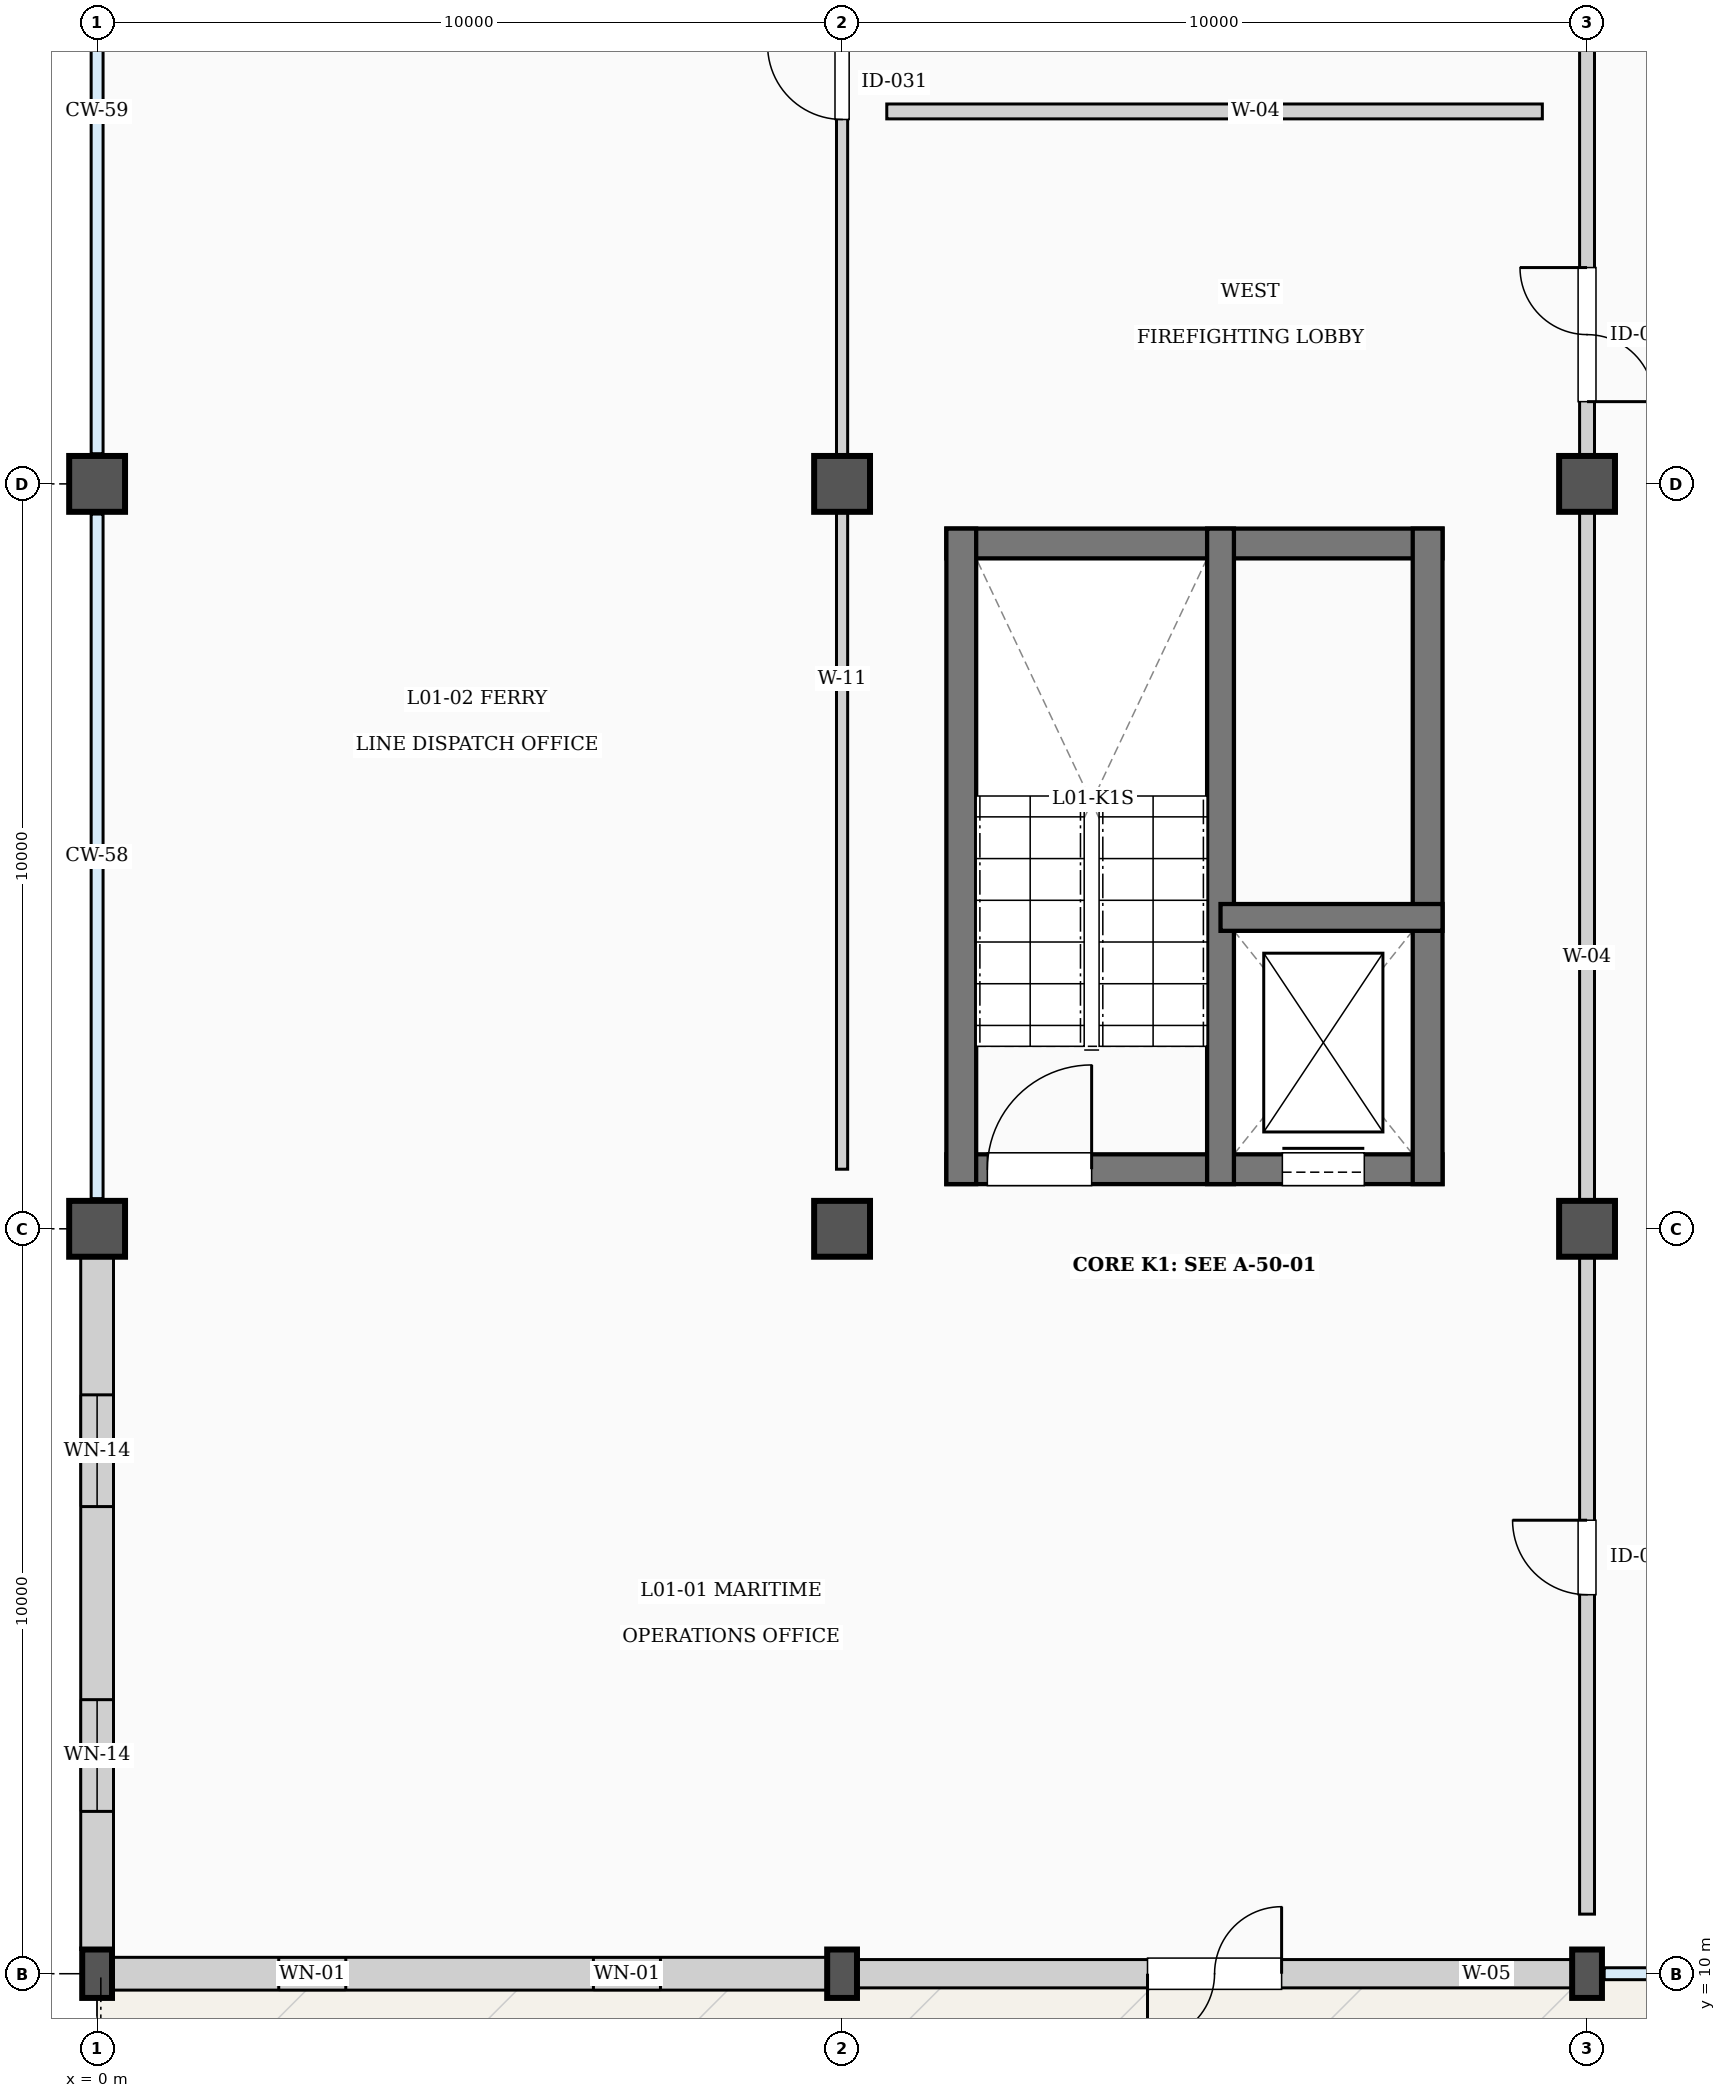
"""IFC4 building model, lengths in metres.
Left out: names, types, materials, properties, quantities, classifications, styles, units other than length and angle.
Written with IfcOpenShell. Run it as: python <this file> out.ifc"""

import sys

from ifc_helpers import new_model, si_unit, direction, frame, frame_2d, origin, origin_2d, place, context, subcontext, project, spatial, rectangle, extrude, element, fill, save


model = new_model("IFC4")
c1 = context("Model", 3, precision=1e-05, world=origin(), true_north=direction((0.0, 1.0)))
c2 = subcontext(c1, "Body", "Model", "MODEL_VIEW")
j1 = project(units=[si_unit("LENGTHUNIT", "METRE"), si_unit("PLANEANGLEUNIT", "RADIAN")], contexts=[c1])
p1 = place(None, origin())
s1 = spatial("IfcSite", under=j1, at=p1, CompositionType="ELEMENT")
p2 = place(p1, origin())
s2 = spatial("IfcBuilding", under=s1, at=p2, CompositionType="ELEMENT")
p3 = place(p2, frame((0.0, 0.0, 5.4)))
s3 = spatial("IfcBuildingStorey", under=s2, at=p3, CompositionType="ELEMENT", Elevation=5.4)
p4 = place(p3, frame((0.0, 10.0, 0.0), z_axis=(0.0, 0.0, 1.0), x_axis=(1.0, 0.0, 0.0)))
e1 = element("IfcColumn", 1, at=p4, inside=s3, PredefinedType="COLUMN", context=c2, shape_type="SweptSolid", body=[
    extrude(rectangle(XDim=0.4, YDim=0.65, at=origin_2d()), origin(), (0.0, 0.0, 1.0), 4.8),
])
for number, where, z_axis, x_axis in (
    (2, (0.0, 20.0, 0.0), (0.0, 0.0, 1.0), (1.0, 0.0, 0.0)),
    (3, (0.0, 30.0, 0.0), (0.0, 0.0, 1.0), (1.0, 0.0, 0.0)),
):
    element("IfcColumn", number, at=place(p3, frame(where, z_axis=z_axis, x_axis=x_axis)), inside=s3, PredefinedType="COLUMN", context=c2, shape_type="SweptSolid", body=[
        extrude(rectangle(XDim=0.75, YDim=0.75, at=origin_2d()), origin(), (0.0, 0.0, 1.0), 4.8),
    ])
p5 = place(p3, frame((10.0, 10.0, 0.0), z_axis=(0.0, 0.0, 1.0), x_axis=(1.0, 0.0, 0.0)))
e4 = element("IfcColumn", 4, at=p5, inside=s3, PredefinedType="COLUMN", context=c2, shape_type="SweptSolid", body=[
    extrude(rectangle(XDim=0.4, YDim=0.65, at=origin_2d()), origin(), (0.0, 0.0, 1.0), 4.8),
])
for number, where, z_axis, x_axis in (
    (5, (10.0, 20.0, 0.0), (0.0, 0.0, 1.0), (1.0, 0.0, 0.0)),
    (6, (10.0, 30.0, 0.0), (0.0, 0.0, 1.0), (1.0, 0.0, 0.0)),
):
    element("IfcColumn", number, at=place(p3, frame(where, z_axis=z_axis, x_axis=x_axis)), inside=s3, PredefinedType="COLUMN", context=c2, shape_type="SweptSolid", body=[
        extrude(rectangle(XDim=0.75, YDim=0.75, at=origin_2d()), origin(), (0.0, 0.0, 1.0), 4.8),
    ])
p6 = place(p3, frame((20.0, 10.0, 0.0), z_axis=(0.0, 0.0, 1.0), x_axis=(1.0, 0.0, 0.0)))
e7 = element("IfcColumn", 7, at=p6, inside=s3, PredefinedType="COLUMN", context=c2, shape_type="SweptSolid", body=[
    extrude(rectangle(XDim=0.4, YDim=0.65, at=origin_2d()), origin(), (0.0, 0.0, 1.0), 4.8),
])
for number, where, z_axis, x_axis in (
    (8, (20.0, 20.0, 0.0), (0.0, 0.0, 1.0), (1.0, 0.0, 0.0)),
    (9, (20.0, 30.0, 0.0), (0.0, 0.0, 1.0), (1.0, 0.0, 0.0)),
):
    element("IfcColumn", number, at=place(p3, frame(where, z_axis=z_axis, x_axis=x_axis)), inside=s3, PredefinedType="COLUMN", context=c2, shape_type="SweptSolid", body=[
        extrude(rectangle(XDim=0.75, YDim=0.75, at=origin_2d()), origin(), (0.0, 0.0, 1.0), 4.8),
    ])
p7 = place(p3, frame((0.2, 10.0, 0.0), z_axis=(0.0, 0.0, 1.0), x_axis=(1.0, 0.0, 0.0)))
e10 = element("IfcWall", 10, at=p7, inside=s3, PredefinedType="SOLIDWALL", context=c2, shape_type="SweptSolid", body=[
    extrude(rectangle(XDim=9.6, YDim=0.44, at=frame_2d((4.8, 0.0))), origin(), (0.0, 0.0, 1.0), 4.05),
])
p8 = place(p7, frame((2.238, 0.0, 0.9)))
e11 = element("IfcOpeningElement", 11, at=p8, cuts=e10, PredefinedType="OPENING", context=c2, shape_type="SweptSolid", body=[
    extrude(rectangle(XDim=0.9, YDim=1.5, at=frame_2d((0.45, 0.75))), frame((0.0, 0.23, 0.0), z_axis=(0.0, -1.0, 0.0), x_axis=(1.0, 0.0, 0.0)), (0.0, 0.0, 1.0), 0.46),
])
p9 = place(p7, frame((6.462, 0.0, 0.9)))
e12 = element("IfcOpeningElement", 12, at=p9, cuts=e10, PredefinedType="OPENING", context=c2, shape_type="SweptSolid", body=[
    extrude(rectangle(XDim=0.9, YDim=1.5, at=frame_2d((0.45, 0.75))), frame((0.0, 0.23, 0.0), z_axis=(0.0, -1.0, 0.0), x_axis=(1.0, 0.0, 0.0)), (0.0, 0.0, 1.0), 0.46),
])
p10 = place(p3, frame((10.2, 10.0, 0.0), z_axis=(0.0, 0.0, 1.0), x_axis=(1.0, 0.0, 0.0)))
e13 = element("IfcWall", 13, at=p10, inside=s3, PredefinedType="SOLIDWALL", context=c2, shape_type="SweptSolid", body=[
    extrude(rectangle(XDim=9.6, YDim=0.38, at=frame_2d((4.8, 0.0))), origin(), (0.0, 0.0, 1.0), 4.05),
])
p11 = place(p10, frame((3.9, 0.0, 0.0)))
e14 = element("IfcOpeningElement", 14, at=p11, cuts=e13, PredefinedType="OPENING", context=c2, shape_type="SweptSolid", body=[
    extrude(rectangle(XDim=1.8, YDim=2.35, at=frame_2d((0.9, 1.175))), frame((0.0, 0.2, 0.0), z_axis=(0.0, -1.0, 0.0), x_axis=(1.0, 0.0, 0.0)), (0.0, 0.0, 1.0), 0.4),
])
p12 = place(p3, frame((0.0, 10.325, 0.0), z_axis=(0.0, 0.0, 1.0), x_axis=(0.0, 1.0, 0.0)))
e15 = element("IfcWall", 15, at=p12, inside=s3, PredefinedType="SOLIDWALL", context=c2, shape_type="SweptSolid", body=[
    extrude(rectangle(XDim=9.3, YDim=0.44, at=frame_2d((4.65, 0.0))), origin(), (0.0, 0.0, 1.0), 4.3),
])
p13 = place(p12, frame((1.854, 0.0, 0.9)))
e16 = element("IfcOpeningElement", 16, at=p13, cuts=e15, PredefinedType="OPENING", context=c2, shape_type="SweptSolid", body=[
    extrude(rectangle(XDim=1.5, YDim=2.4, at=frame_2d((0.75, 1.2))), frame((0.0, 0.23, 0.0), z_axis=(0.0, -1.0, 0.0), x_axis=(1.0, 0.0, 0.0)), (0.0, 0.0, 1.0), 0.46),
])
p14 = place(p12, frame((5.946, 0.0, 0.9)))
e17 = element("IfcOpeningElement", 17, at=p14, cuts=e15, PredefinedType="OPENING", context=c2, shape_type="SweptSolid", body=[
    extrude(rectangle(XDim=1.5, YDim=2.4, at=frame_2d((0.75, 1.2))), frame((0.0, 0.23, 0.0), z_axis=(0.0, -1.0, 0.0), x_axis=(1.0, 0.0, 0.0)), (0.0, 0.0, 1.0), 0.46),
])
p15 = place(p3, frame((11.4, 20.8, 0.0), z_axis=(0.0, 0.0, 1.0), x_axis=(1.0, 0.0, 0.0)))
e18 = element("IfcWall", 18, at=p15, inside=s3, PredefinedType="SHEAR", context=c2, shape_type="SweptSolid", body=[
    extrude(rectangle(XDim=6.66, YDim=0.4, at=frame_2d((3.33, 0.0))), origin(), (0.0, 0.0, 1.0), 4.8),
])
p16 = place(p15, frame((0.55, 0.0, 0.0)))
e19 = element("IfcOpeningElement", 19, at=p16, cuts=e18, PredefinedType="OPENING", context=c2, shape_type="SweptSolid", body=[
    extrude(rectangle(XDim=1.4, YDim=2.35, at=frame_2d((0.7, 1.175))), frame((0.0, 0.21, 0.0), z_axis=(0.0, -1.0, 0.0), x_axis=(1.0, 0.0, 0.0)), (0.0, 0.0, 1.0), 0.42),
])
p17 = place(p15, frame((4.51, 0.0, 0.0)))
e20 = element("IfcOpeningElement", 20, at=p17, cuts=e18, PredefinedType="OPENING", context=c2, shape_type="SweptSolid", body=[
    extrude(rectangle(XDim=1.1, YDim=2.3, at=frame_2d((0.55, 1.15))), frame((0.0, 0.21, 0.0), z_axis=(0.0, -1.0, 0.0), x_axis=(1.0, 0.0, 0.0)), (0.0, 0.0, 1.0), 0.42),
])
p18 = place(p3, frame((11.4, 29.2, 0.0), z_axis=(0.0, 0.0, 1.0), x_axis=(1.0, 0.0, 0.0)))
e21 = element("IfcWall", 21, at=p18, inside=s3, PredefinedType="SHEAR", context=c2, shape_type="SweptSolid", body=[
    extrude(rectangle(XDim=6.66, YDim=0.4, at=frame_2d((3.33, 0.0))), origin(), (0.0, 0.0, 1.0), 4.8),
])
for number, where, z_axis, x_axis in (
    (22, (11.6, 20.6, 0.0), (0.0, 0.0, 1.0), (0.0, 1.0, 0.0)),
    (23, (17.86, 20.6, 0.0), (0.0, 0.0, 1.0), (0.0, 1.0, 0.0)),
):
    element("IfcWall", number, at=place(p3, frame(where, z_axis=z_axis, x_axis=x_axis)), inside=s3, PredefinedType="SHEAR", context=c2, shape_type="SweptSolid", body=[
        extrude(rectangle(XDim=8.8, YDim=0.4, at=frame_2d((4.4, 0.0))), origin(), (0.0, 0.0, 1.0), 4.8),
    ])
p19 = place(p3, frame((15.08, 20.6, 0.0), z_axis=(0.0, 0.0, 1.0), x_axis=(0.0, 1.0, 0.0)))
e24 = element("IfcWall", 24, at=p19, inside=s3, PredefinedType="SHEAR", context=c2, shape_type="SweptSolid", body=[
    extrude(rectangle(XDim=8.8, YDim=0.36, at=frame_2d((4.4, 0.0))), origin(), (0.0, 0.0, 1.0), 4.8),
])
p20 = place(p3, frame((15.08, 24.18, 0.0), z_axis=(0.0, 0.0, 1.0), x_axis=(1.0, 0.0, 0.0)))
e25 = element("IfcWall", 25, at=p20, inside=s3, PredefinedType="SHEAR", context=c2, shape_type="SweptSolid", body=[
    extrude(rectangle(XDim=2.98, YDim=0.36, at=frame_2d((1.49, 0.0))), origin(), (0.0, 0.0, 1.0), 4.8),
])
p21 = place(p3, frame((20.0, 10.8, 0.0), z_axis=(0.0, 0.0, 1.0), x_axis=(0.0, 1.0, 0.0)))
e26 = element("IfcWall", 26, at=p21, inside=s3, PredefinedType="PARTITIONING", context=c2, shape_type="SweptSolid", body=[
    extrude(rectangle(XDim=68.4, YDim=0.2, at=frame_2d((34.2, 0.0))), origin(), (0.0, 0.0, 1.0), 4.23),
])
p22 = place(p21, frame((4.288, 0.0, 0.0)))
e27 = element("IfcOpeningElement", 27, at=p22, cuts=e26, PredefinedType="OPENING", context=c2, shape_type="SweptSolid", body=[
    extrude(rectangle(XDim=1.0, YDim=2.3, at=frame_2d((0.5, 1.15))), frame((0.0, 0.11, 0.0), z_axis=(0.0, -1.0, 0.0), x_axis=(1.0, 0.0, 0.0)), (0.0, 0.0, 1.0), 0.22),
])
p23 = place(p21, frame((20.304, 0.0, 0.0)))
e28 = element("IfcOpeningElement", 28, at=p23, cuts=e26, PredefinedType="OPENING", context=c2, shape_type="SweptSolid", body=[
    extrude(rectangle(XDim=1.8, YDim=2.45, at=frame_2d((0.9, 1.225))), frame((0.0, 0.11, 0.0), z_axis=(0.0, -1.0, 0.0), x_axis=(1.0, 0.0, 0.0)), (0.0, 0.0, 1.0), 0.22),
])
p24 = place(p21, frame((30.464, 0.0, 0.0)))
e29 = element("IfcOpeningElement", 29, at=p24, cuts=e26, PredefinedType="OPENING", context=c2, shape_type="SweptSolid", body=[
    extrude(rectangle(XDim=2.0, YDim=2.45, at=frame_2d((1.0, 1.225))), frame((0.0, 0.11, 0.0), z_axis=(0.0, -1.0, 0.0), x_axis=(1.0, 0.0, 0.0)), (0.0, 0.0, 1.0), 0.22),
])
p25 = place(p21, frame((63.087, 0.0, 0.0)))
e30 = element("IfcOpeningElement", 30, at=p25, cuts=e26, PredefinedType="OPENING", context=c2, shape_type="SweptSolid", body=[
    extrude(rectangle(XDim=1.05, YDim=2.3, at=frame_2d((0.525, 1.15))), frame((0.0, 0.11, 0.0), z_axis=(0.0, -1.0, 0.0), x_axis=(1.0, 0.0, 0.0)), (0.0, 0.0, 1.0), 0.22),
])
p26 = place(p3, frame((10.0, 20.8, 0.0), z_axis=(0.0, 0.0, 1.0), x_axis=(0.0, 1.0, 0.0)))
e31 = element("IfcWall", 31, at=p26, inside=s3, PredefinedType="PARTITIONING", context=c2, shape_type="SweptSolid", body=[
    extrude(rectangle(XDim=38.4, YDim=0.15, at=frame_2d((19.2, 0.0))), origin(), (0.0, 0.0, 1.0), 4.23),
])
p27 = place(p26, frame((14.092, 0.0, 0.0)))
e32 = element("IfcOpeningElement", 32, at=p27, cuts=e31, PredefinedType="OPENING", context=c2, shape_type="SweptSolid", body=[
    extrude(rectangle(XDim=1.0, YDim=2.4, at=frame_2d((0.5, 1.2))), frame((0.0, 0.085, 0.0), z_axis=(0.0, -1.0, 0.0), x_axis=(1.0, 0.0, 0.0)), (0.0, 0.0, 1.0), 0.17),
])
p28 = place(p26, frame((33.242, 0.0, 0.0)))
e33 = element("IfcOpeningElement", 33, at=p28, cuts=e31, PredefinedType="OPENING", context=c2, shape_type="SweptSolid", body=[
    extrude(rectangle(XDim=1.1, YDim=2.3, at=frame_2d((0.55, 1.15))), frame((0.0, 0.085, 0.0), z_axis=(0.0, -1.0, 0.0), x_axis=(1.0, 0.0, 0.0)), (0.0, 0.0, 1.0), 0.17),
])
p29 = place(p3, frame((10.6, 35.0, 0.0), z_axis=(0.0, 0.0, 1.0), x_axis=(1.0, 0.0, 0.0)))
e34 = element("IfcWall", 34, at=p29, inside=s3, PredefinedType="PARTITIONING", context=c2, shape_type="SweptSolid", body=[
    extrude(rectangle(XDim=8.8, YDim=0.2, at=frame_2d((4.4, 0.0))), origin(), (0.0, 0.0, 1.0), 4.46),
])
p30 = place(p8, origin())
e35 = element("IfcWindow", 35, at=p30, inside=s3, PartitioningType="SINGLE_PANEL", PredefinedType="WINDOW", context=c2, shape_type="SweptSolid", body=[
    extrude(rectangle(XDim=0.9, YDim=1.5, at=frame_2d((0.45, 0.75))), frame((0.0, 0.03, 0.0), z_axis=(0.0, -1.0, 0.0), x_axis=(1.0, 0.0, 0.0)), (0.0, 0.0, 1.0), 0.06),
])
fill(e11, e35)
p31 = place(p9, origin())
e36 = element("IfcWindow", 36, at=p31, inside=s3, PartitioningType="SINGLE_PANEL", PredefinedType="WINDOW", context=c2, shape_type="SweptSolid", body=[
    extrude(rectangle(XDim=0.9, YDim=1.5, at=frame_2d((0.45, 0.75))), frame((0.0, 0.03, 0.0), z_axis=(0.0, -1.0, 0.0), x_axis=(1.0, 0.0, 0.0)), (0.0, 0.0, 1.0), 0.06),
])
fill(e12, e36)
p32 = place(p11, origin())
e37 = element("IfcDoor", 37, at=p32, inside=s3, OperationType="DOUBLE_DOOR_SINGLE_SWING", PredefinedType="DOOR", context=c2, shape_type="SweptSolid", body=[
    extrude(rectangle(XDim=1.8, YDim=2.35, at=frame_2d((0.9, 1.175))), frame((0.0, 0.025, 0.0), z_axis=(0.0, -1.0, 0.0), x_axis=(1.0, 0.0, 0.0)), (0.0, 0.0, 1.0), 0.05),
])
fill(e14, e37)
p33 = place(p13, origin())
e38 = element("IfcWindow", 38, at=p33, inside=s3, PartitioningType="SINGLE_PANEL", PredefinedType="WINDOW", context=c2, shape_type="SweptSolid", body=[
    extrude(rectangle(XDim=1.5, YDim=2.4, at=frame_2d((0.75, 1.2))), frame((0.0, 0.03, 0.0), z_axis=(0.0, -1.0, 0.0), x_axis=(1.0, 0.0, 0.0)), (0.0, 0.0, 1.0), 0.06),
])
fill(e16, e38)
p34 = place(p14, origin())
e39 = element("IfcWindow", 39, at=p34, inside=s3, PartitioningType="SINGLE_PANEL", PredefinedType="WINDOW", context=c2, shape_type="SweptSolid", body=[
    extrude(rectangle(XDim=1.5, YDim=2.4, at=frame_2d((0.75, 1.2))), frame((0.0, 0.03, 0.0), z_axis=(0.0, -1.0, 0.0), x_axis=(1.0, 0.0, 0.0)), (0.0, 0.0, 1.0), 0.06),
])
fill(e17, e39)
p35 = place(p16, origin())
e40 = element("IfcDoor", 40, at=p35, inside=s3, OperationType="SINGLE_SWING_RIGHT", PredefinedType="DOOR", context=c2, shape_type="SweptSolid", body=[
    extrude(rectangle(XDim=1.4, YDim=2.35, at=frame_2d((0.7, 1.175))), frame((0.0, 0.025, 0.0), z_axis=(0.0, -1.0, 0.0), x_axis=(1.0, 0.0, 0.0)), (0.0, 0.0, 1.0), 0.05),
])
fill(e19, e40)
p36 = place(p17, origin())
e41 = element("IfcDoor", 41, at=p36, inside=s3, OperationType="SLIDING_TO_LEFT", PredefinedType="DOOR", context=c2, shape_type="SweptSolid", body=[
    extrude(rectangle(XDim=1.1, YDim=2.3, at=frame_2d((0.55, 1.15))), frame((0.0, 0.025, 0.0), z_axis=(0.0, -1.0, 0.0), x_axis=(1.0, 0.0, 0.0)), (0.0, 0.0, 1.0), 0.05),
])
fill(e20, e41)
p37 = place(p22, origin())
e42 = element("IfcDoor", 42, at=p37, inside=s3, OperationType="SINGLE_SWING_RIGHT", PredefinedType="DOOR", context=c2, shape_type="SweptSolid", body=[
    extrude(rectangle(XDim=1.0, YDim=2.3, at=frame_2d((0.5, 1.15))), frame((0.0, 0.025, 0.0), z_axis=(0.0, -1.0, 0.0), x_axis=(1.0, 0.0, 0.0)), (0.0, 0.0, 1.0), 0.05),
])
fill(e27, e42)
p38 = place(p23, origin())
e43 = element("IfcDoor", 43, at=p38, inside=s3, OperationType="DOUBLE_DOOR_SINGLE_SWING", PredefinedType="DOOR", context=c2, shape_type="SweptSolid", body=[
    extrude(rectangle(XDim=1.8, YDim=2.45, at=frame_2d((0.9, 1.225))), frame((0.0, 0.025, 0.0), z_axis=(0.0, -1.0, 0.0), x_axis=(1.0, 0.0, 0.0)), (0.0, 0.0, 1.0), 0.05),
])
fill(e28, e43)
p39 = place(p27, origin())
e44 = element("IfcDoor", 44, at=p39, inside=s3, OperationType="SINGLE_SWING_RIGHT", PredefinedType="DOOR", context=c2, shape_type="SweptSolid", body=[
    extrude(rectangle(XDim=1.0, YDim=2.4, at=frame_2d((0.5, 1.2))), frame((0.0, 0.025, 0.0), z_axis=(0.0, -1.0, 0.0), x_axis=(1.0, 0.0, 0.0)), (0.0, 0.0, 1.0), 0.05),
])
fill(e32, e44)
save(model, sys.argv[1])
